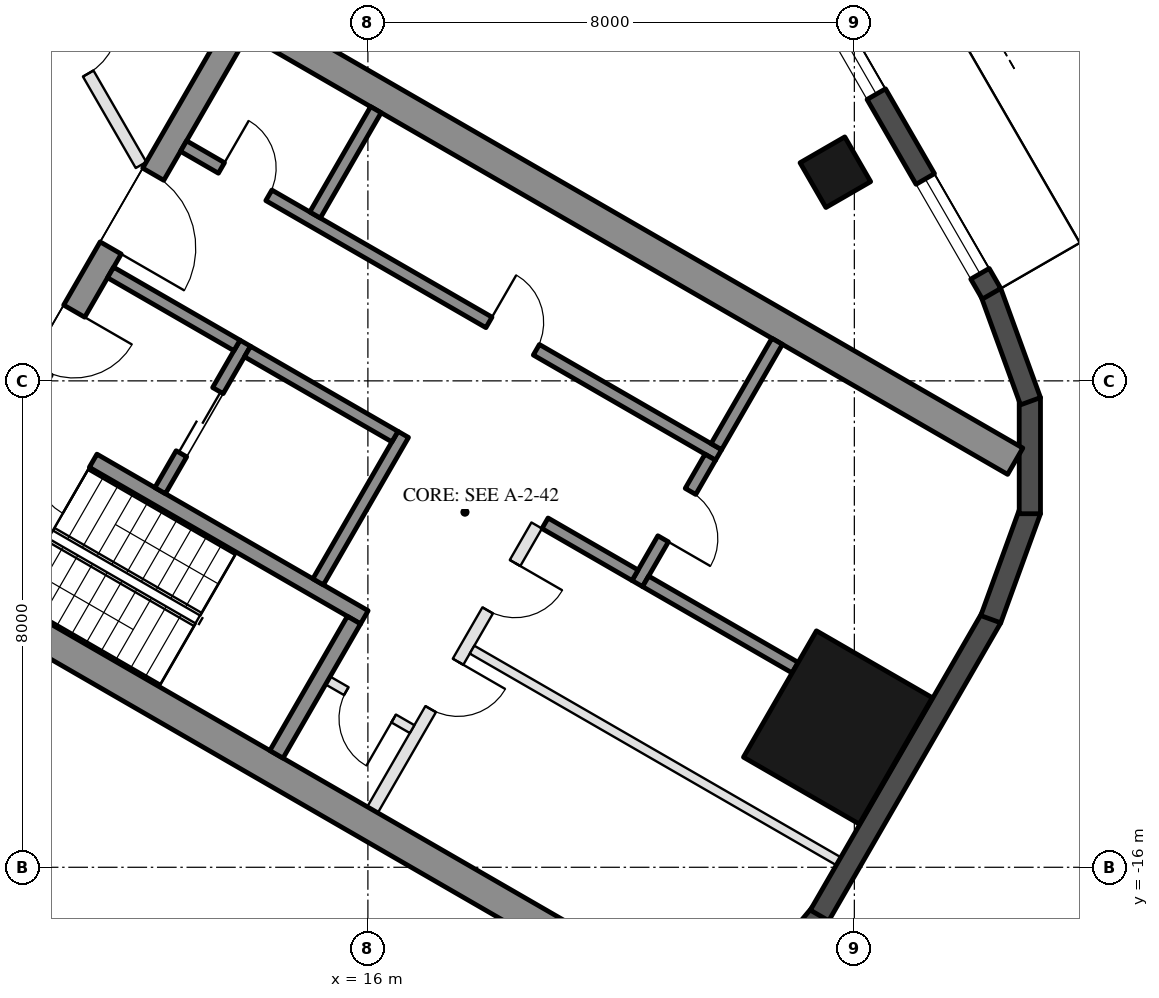
"""IFC4 building model, lengths in metres.
Left out: names, types, materials, properties, quantities, classifications, styles, units other than length and angle.
Written with IfcOpenShell. Run it as: python <this file> out.ifc"""

import sys

from ifc_helpers import new_model, si_unit, direction, frame, frame_2d, origin, origin_2d, place, context, subcontext, project, spatial, rectangle, hollow_rectangle, extrude, element, fill, save


model = new_model("IFC4")
c1 = context("Model", 3, precision=1e-05, world=origin(), true_north=direction((0.0, 1.0)))
c2 = subcontext(c1, "Body", "Model", "MODEL_VIEW")
j1 = project(units=[si_unit("LENGTHUNIT", "METRE"), si_unit("PLANEANGLEUNIT", "RADIAN")], contexts=[c1])
p1 = place(None, origin())
s1 = spatial("IfcSite", under=j1, at=p1, CompositionType="ELEMENT")
p2 = place(p1, origin())
s2 = spatial("IfcBuilding", under=s1, at=p2, CompositionType="ELEMENT")
p3 = place(p2, frame((0.0, 0.0, 179.9)))
s3 = spatial("IfcBuildingStorey", under=s2, at=p3, CompositionType="ELEMENT", Elevation=179.9)
p4 = place(p3, frame((23.688, -4.568, 0.0), z_axis=(0.0, 0.0, 1.0), x_axis=(-0.5, 0.866025403784, 0.0)))
e1 = element("IfcColumn", 1, at=p4, inside=s3, PredefinedType="COLUMN", context=c2, shape_type="SweptSolid", body=[
    extrude(hollow_rectangle(XDim=0.85, YDim=0.85, WallThickness=0.04, at=origin_2d()), origin(), (0.0, 0.0, 1.0), 3.7),
])
p5 = place(p3, frame((23.729, -13.7, 0.0), z_axis=(0.0, 0.0, 1.0), x_axis=(0.5, 0.866025403784, 0.0)))
e2 = element("IfcColumn", 2, at=p5, inside=s3, PredefinedType="COLUMN", context=c2, shape_type="SweptSolid", body=[
    extrude(hollow_rectangle(XDim=2.4, YDim=2.2, WallThickness=0.06, at=origin_2d()), origin(), (0.0, 0.0, 1.0), 3.7),
])
p6 = place(p3, frame((22.217, -18.231, 0.0), z_axis=(0.0, 0.0, 1.0), x_axis=(0.642733291068, 0.76609001857, 0.0)))
e3 = element("IfcWall", 3, at=p6, inside=s3, PredefinedType="SOLIDWALL", context=c2, shape_type="SweptSolid", body=[
    extrude(rectangle(XDim=1.91, YDim=0.35, at=frame_2d((0.955, 0.0))), origin(), (0.0, 0.0, 1.0), 3.55),
])
p7 = place(p3, frame((23.427, -16.792, 0.0), z_axis=(0.0, 0.0, 1.0), x_axis=(0.500018773155, 0.866014564827, 0.0)))
e4 = element("IfcWall", 4, at=p7, inside=s3, PredefinedType="SOLIDWALL", context=c2, shape_type="SweptSolid", body=[
    extrude(rectangle(XDim=5.658, YDim=0.35, at=frame_2d((2.829, 0.0))), origin(), (0.0, 0.0, 1.0), 3.55),
])
for number, where, z_axis, x_axis in (
    (5, (26.244, -11.92, 0.0), (0.0, 0.0, 1.0), (0.342, 0.94, 0.0)),
    (6, (26.886, -10.185, 0.0), (0.0, 0.0, 1.0), (0.0, 1.0, 0.0)),
    (7, (26.897, -8.335, 0.0), (0.0, 0.0, 1.0), (-0.342, 0.94, 0.0)),
):
    element("IfcWall", number, at=place(p3, frame(where, z_axis=z_axis, x_axis=x_axis)), inside=s3, PredefinedType="SOLIDWALL", context=c2, shape_type="SweptSolid", body=[
        extrude(rectangle(XDim=1.91, YDim=0.35, at=frame_2d((0.955, 0.0))), origin(), (0.0, 0.0, 1.0), 3.55),
    ])
p8 = place(p3, frame((26.257, -6.567, 0.0), z_axis=(0.0, 0.0, 1.0), x_axis=(-0.500023526245, 0.866011820475, 0.0)))
e8 = element("IfcWall", 8, at=p8, inside=s3, PredefinedType="SOLIDWALL", context=c2, shape_type="SweptSolid", body=[
    extrude(rectangle(XDim=11.816, YDim=0.35, at=frame_2d((5.908, 0.0))), origin(), (0.0, 0.0, 1.0), 3.55),
])
p9 = place(p8, frame((0.38, 0.0, 0.3)))
e9 = element("IfcOpeningElement", 9, at=p9, cuts=e8, PredefinedType="OPENING", context=c2, shape_type="SweptSolid", body=[
    extrude(rectangle(XDim=1.8, YDim=2.65, at=frame_2d((0.9, 1.325))), frame((0.0, 0.185, 0.0), z_axis=(0.0, -1.0, 0.0), x_axis=(1.0, 0.0, 0.0)), (0.0, 0.0, 1.0), 0.37),
])
p10 = place(p8, frame((7.741, 0.0, 0.0)))
e10 = element("IfcOpeningElement", 10, at=p10, cuts=e8, PredefinedType="OPENING", context=c2, shape_type="SweptSolid", body=[
    extrude(rectangle(XDim=2.4, YDim=2.4, at=frame_2d((1.2, 1.2))), frame((0.0, 0.185, 0.0), z_axis=(0.0, -1.0, 0.0), x_axis=(1.0, 0.0, 0.0)), (0.0, 0.0, 1.0), 0.37),
])
p11 = place(p8, frame((3.791, 0.0, 0.3)))
e11 = element("IfcOpeningElement", 11, at=p11, cuts=e8, PredefinedType="OPENING", context=c2, shape_type="SweptSolid", body=[
    extrude(rectangle(XDim=1.6, YDim=2.65, at=frame_2d((0.8, 1.325))), frame((0.0, 0.185, 0.0), z_axis=(0.0, -1.0, 0.0), x_axis=(1.0, 0.0, 0.0)), (0.0, 0.0, 1.0), 0.37),
])
p12 = place(p8, frame((5.691, 0.0, 0.3)))
e12 = element("IfcOpeningElement", 12, at=p12, cuts=e8, PredefinedType="OPENING", context=c2, shape_type="SweptSolid", body=[
    extrude(rectangle(XDim=1.6, YDim=2.65, at=frame_2d((0.8, 1.325))), frame((0.0, 0.185, 0.0), z_axis=(0.0, -1.0, 0.0), x_axis=(1.0, 0.0, 0.0)), (0.0, 0.0, 1.0), 0.37),
])
for number, where, z_axis, x_axis in (
    (13, (8.547, -10.997, 0.0), (0.0, 0.0, 1.0), (0.866, -0.5, 0.0)),
    (14, (13.797, -1.903, 0.0), (0.0, 0.0, 1.0), (0.866, -0.5, 0.0)),
):
    element("IfcWall", number, at=place(p3, frame(where, z_axis=z_axis, x_axis=x_axis)), inside=s3, PredefinedType="SHEAR", context=c2, shape_type="SweptSolid", body=[
        extrude(rectangle(XDim=14.837, YDim=0.5, at=frame_2d((7.418, 0.0))), origin(), (0.0, 0.0, 1.0), 3.5),
    ])
p13 = place(p3, frame((8.845, -10.88, 0.0), z_axis=(0.0, 0.0, 1.0), x_axis=(0.500004234368, 0.866022959057, 0.0)))
e15 = element("IfcWall", 15, at=p13, inside=s3, PredefinedType="SHEAR", context=c2, shape_type="SweptSolid", body=[
    extrude(rectangle(XDim=10.0, YDim=0.4, at=frame_2d((5.0, 0.0))), origin(), (0.0, 0.0, 1.0), 3.5),
])
p14 = place(p13, frame((3.55, 0.0, 0.0)))
e16 = element("IfcOpeningElement", 16, at=p14, cuts=e15, PredefinedType="OPENING", context=c2, shape_type="SweptSolid", body=[
    extrude(rectangle(XDim=1.1, YDim=2.1, at=frame_2d((0.55, 1.05))), frame((0.0, 0.21, 0.0), z_axis=(0.0, -1.0, 0.0), x_axis=(1.0, 0.0, 0.0)), (0.0, 0.0, 1.0), 0.42),
])
p15 = place(p13, frame((5.85, 0.0, 0.0)))
e17 = element("IfcOpeningElement", 17, at=p15, cuts=e15, PredefinedType="OPENING", context=c2, shape_type="SweptSolid", body=[
    extrude(rectangle(XDim=1.4, YDim=2.1, at=frame_2d((0.7, 1.05))), frame((0.0, 0.21, 0.0), z_axis=(0.0, -1.0, 0.0), x_axis=(1.0, 0.0, 0.0)), (0.0, 0.0, 1.0), 0.42),
])
p16 = place(p3, frame((10.356, -8.664, 0.0), z_axis=(0.0, 0.0, 1.0), x_axis=(0.866028629588, -0.499994412703, 0.0)))
e18 = element("IfcWall", 18, at=p16, inside=s3, PredefinedType="SHEAR", context=c2, shape_type="SweptSolid", body=[
    extrude(rectangle(XDim=6.45, YDim=0.25, at=frame_2d((3.225, 0.0))), origin(), (0.0, 0.0, 1.0), 3.5),
])
p17 = place(p16, frame((0.3, 0.0, 0.0)))
e19 = element("IfcOpeningElement", 19, at=p17, cuts=e18, PredefinedType="OPENING", context=c2, shape_type="SweptSolid", body=[
    extrude(rectangle(XDim=1.0, YDim=2.1, at=frame_2d((0.5, 1.05))), frame((0.0, 0.135, 0.0), z_axis=(0.0, -1.0, 0.0), x_axis=(1.0, 0.0, 0.0)), (0.0, 0.0, 1.0), 0.27),
])
p18 = place(p3, frame((14.496, -14.143, 0.0), z_axis=(0.0, 0.0, 1.0), x_axis=(0.500062241894, 0.865989465428, 0.0)))
e20 = element("IfcWall", 20, at=p18, inside=s3, PredefinedType="SHEAR", context=c2, shape_type="SweptSolid", body=[
    extrude(rectangle(XDim=2.55, YDim=0.25, at=frame_2d((1.275, 0.0))), origin(), (0.0, 0.0, 1.0), 3.5),
])
p19 = place(p3, frame((15.181, -11.305, 0.0), z_axis=(0.0, 0.0, 1.0), x_axis=(0.49994636267, 0.866056369097, 0.0)))
e21 = element("IfcWall", 21, at=p19, inside=s3, PredefinedType="SHEAR", context=c2, shape_type="SweptSolid", body=[
    extrude(rectangle(XDim=2.8, YDim=0.2, at=frame_2d((1.4, 0.0))), origin(), (0.0, 0.0, 1.0), 3.5),
])
p20 = place(p3, frame((12.583, -9.805, 0.0), z_axis=(0.0, 0.0, 1.0), x_axis=(0.49994636267, 0.866056369097, 0.0)))
e22 = element("IfcWall", 22, at=p20, inside=s3, PredefinedType="SHEAR", context=c2, shape_type="SweptSolid", body=[
    extrude(rectangle(XDim=2.8, YDim=0.2, at=frame_2d((1.4, 0.0))), origin(), (0.0, 0.0, 1.0), 3.5),
])
p21 = place(p20, frame((0.7, 0.0, 0.0)))
e23 = element("IfcOpeningElement", 23, at=p21, cuts=e22, PredefinedType="OPENING", context=c2, shape_type="SweptSolid", body=[
    extrude(rectangle(XDim=1.2, YDim=2.1, at=frame_2d((0.6, 1.05))), frame((0.0, 0.11, 0.0), z_axis=(0.0, -1.0, 0.0), x_axis=(1.0, 0.0, 0.0)), (0.0, 0.0, 1.0), 0.22),
])
p22 = place(p3, frame((11.768, -6.217, 0.0), z_axis=(0.0, 0.0, 1.0), x_axis=(0.866050077142, -0.499957262057, 0.0)))
e24 = element("IfcWall", 24, at=p22, inside=s3, PredefinedType="SHEAR", context=c2, shape_type="SweptSolid", body=[
    extrude(rectangle(XDim=2.4, YDim=0.2, at=frame_2d((1.2, 0.0))), origin(), (0.0, 0.0, 1.0), 3.5),
])
p23 = place(p3, frame((14.02, -7.517, 0.0), z_axis=(0.0, 0.0, 1.0), x_axis=(0.866034573852, -0.49998411664, 0.0)))
e25 = element("IfcWall", 25, at=p23, inside=s3, PredefinedType="SHEAR", context=c2, shape_type="SweptSolid", body=[
    extrude(rectangle(XDim=2.8, YDim=0.2, at=frame_2d((1.4, 0.0))), origin(), (0.0, 0.0, 1.0), 3.5),
])
p24 = place(p3, frame((12.968, -4.138, 0.0), z_axis=(0.0, 0.0, 1.0), x_axis=(0.866028328073, -0.49999493495, 0.0)))
e26 = element("IfcWall", 26, at=p24, inside=s3, PredefinedType="SHEAR", context=c2, shape_type="SweptSolid", body=[
    extrude(rectangle(XDim=10.16, YDim=0.2, at=frame_2d((5.08, 0.0))), origin(), (0.0, 0.0, 1.0), 3.5),
])
p25 = place(p24, frame((0.72, 0.0, 0.0)))
e27 = element("IfcOpeningElement", 27, at=p25, cuts=e26, PredefinedType="OPENING", context=c2, shape_type="SweptSolid", body=[
    extrude(rectangle(XDim=0.9, YDim=2.1, at=frame_2d((0.45, 1.05))), frame((0.0, 0.11, 0.0), z_axis=(0.0, -1.0, 0.0), x_axis=(1.0, 0.0, 0.0)), (0.0, 0.0, 1.0), 0.22),
])
p26 = place(p24, frame((5.8, 0.0, 0.0)))
e28 = element("IfcOpeningElement", 28, at=p26, cuts=e26, PredefinedType="OPENING", context=c2, shape_type="SweptSolid", body=[
    extrude(rectangle(XDim=0.9, YDim=2.1, at=frame_2d((0.45, 1.05))), frame((0.0, 0.11, 0.0), z_axis=(0.0, -1.0, 0.0), x_axis=(1.0, 0.0, 0.0)), (0.0, 0.0, 1.0), 0.22),
])
p27 = place(p3, frame((20.43, -11.333, 0.0), z_axis=(0.0, 0.0, 1.0), x_axis=(0.500001309137, 0.866024647952, 0.0)))
e29 = element("IfcWall", 29, at=p27, inside=s3, PredefinedType="SHEAR", context=c2, shape_type="SweptSolid", body=[
    extrude(rectangle(XDim=2.4, YDim=0.2, at=frame_2d((1.2, 0.0))), origin(), (0.0, 0.0, 1.0), 3.5),
])
p28 = place(p27, frame((0.85, 0.0, 0.0)))
e30 = element("IfcOpeningElement", 30, at=p28, cuts=e29, PredefinedType="OPENING", context=c2, shape_type="SweptSolid", body=[
    extrude(rectangle(XDim=0.9, YDim=2.1, at=frame_2d((0.45, 1.05))), frame((0.0, 0.11, 0.0), z_axis=(0.0, -1.0, 0.0), x_axis=(1.0, 0.0, 0.0)), (0.0, 0.0, 1.0), 0.22),
])
p29 = place(p3, frame((18.913, -10.342, 0.0), z_axis=(0.0, 0.0, 1.0), x_axis=(0.866038183914, -0.499977863513, 0.0)))
e31 = element("IfcWall", 31, at=p29, inside=s3, PredefinedType="SHEAR", context=c2, shape_type="SweptSolid", body=[
    extrude(rectangle(XDim=1.71, YDim=0.2, at=frame_2d((0.855, 0.0))), origin(), (0.0, 0.0, 1.0), 3.5),
])
for number, where, z_axis, x_axis in (
    (32, (15.131, -5.272, 0.0), (0.0, 0.0, 1.0), (0.5, 0.866, 0.0)),
    (33, (21.73, -9.082, 0.0), (0.0, 0.0, 1.0), (0.5, 0.866, 0.0)),
):
    element("IfcWall", number, at=place(p3, frame(where, z_axis=z_axis, x_axis=x_axis)), inside=s3, PredefinedType="SHEAR", context=c2, shape_type="SweptSolid", body=[
        extrude(rectangle(XDim=2.0, YDim=0.2, at=frame_2d((1.0, 0.0))), origin(), (0.0, 0.0, 1.0), 3.5),
    ])
p30 = place(p3, frame((20.567, -11.297, 0.0), z_axis=(0.0, 0.0, 1.0), x_axis=(0.866055327414, -0.49994816717, 0.0)))
e34 = element("IfcWall", 34, at=p30, inside=s3, PredefinedType="SHEAR", context=c2, shape_type="SweptSolid", body=[
    extrude(rectangle(XDim=2.84, YDim=0.2, at=frame_2d((1.42, 0.0))), origin(), (0.0, 0.0, 1.0), 3.5),
])
p31 = place(p3, frame((16.076, -15.055, 0.0), z_axis=(0.0, 0.0, 1.0), x_axis=(0.499995103361, 0.866028230842, 0.0)))
e35 = element("IfcWall", 35, at=p31, inside=s3, PredefinedType="PARTITIONING", context=c2, shape_type="SweptSolid", body=[
    extrude(rectangle(XDim=5.4, YDim=0.2, at=frame_2d((2.7, 0.0))), origin(), (0.0, 0.0, 1.0), 3.5),
])
p32 = place(p31, frame((1.913, 0.0, 0.0)))
e36 = element("IfcOpeningElement", 36, at=p32, cuts=e35, PredefinedType="OPENING", context=c2, shape_type="SweptSolid", body=[
    extrude(rectangle(XDim=0.9, YDim=2.1, at=frame_2d((0.45, 1.05))), frame((0.0, 0.11, 0.0), z_axis=(0.0, -1.0, 0.0), x_axis=(1.0, 0.0, 0.0)), (0.0, 0.0, 1.0), 0.22),
])
p33 = place(p31, frame((3.788, 0.0, 0.0)))
e37 = element("IfcOpeningElement", 37, at=p33, cuts=e35, PredefinedType="OPENING", context=c2, shape_type="SweptSolid", body=[
    extrude(rectangle(XDim=0.9, YDim=2.1, at=frame_2d((0.45, 1.05))), frame((0.0, 0.11, 0.0), z_axis=(0.0, -1.0, 0.0), x_axis=(1.0, 0.0, 0.0)), (0.0, 0.0, 1.0), 0.22),
])
p34 = place(p3, frame((15.342, -12.928, 0.0), z_axis=(0.0, 0.0, 1.0), x_axis=(0.865989903783, -0.500061482766, 0.0)))
e38 = element("IfcWall", 38, at=p34, inside=s3, PredefinedType="PARTITIONING", context=c2, shape_type="SweptSolid", body=[
    extrude(rectangle(XDim=1.6, YDim=0.15, at=frame_2d((0.8, 0.0))), origin(), (0.0, 0.0, 1.0), 3.5),
])
p35 = place(p34, frame((0.35, 0.0, 0.0)))
e39 = element("IfcOpeningElement", 39, at=p35, cuts=e38, PredefinedType="OPENING", context=c2, shape_type="SweptSolid", body=[
    extrude(rectangle(XDim=0.9, YDim=2.1, at=frame_2d((0.45, 1.05))), frame((0.0, 0.085, 0.0), z_axis=(0.0, -1.0, 0.0), x_axis=(1.0, 0.0, 0.0)), (0.0, 0.0, 1.0), 0.17),
])
p36 = place(p3, frame((17.713, -12.42, 0.0), z_axis=(0.0, 0.0, 1.0), x_axis=(0.866016523273, -0.500015381182, 0.0)))
e40 = element("IfcWall", 40, at=p36, inside=s3, PredefinedType="PARTITIONING", context=c2, shape_type="SweptSolid", body=[
    extrude(rectangle(XDim=6.95, YDim=0.15, at=frame_2d((3.475, 0.0))), origin(), (0.0, 0.0, 1.0), 3.5),
])
p37 = place(p3, frame((10.032, -0.576, 0.0), z_axis=(0.0, 0.0, 1.0), x_axis=(0.500042097992, -0.866001097133, 0.0)))
e41 = element("IfcWall", 41, at=p37, inside=s3, PredefinedType="PARTITIONING", context=c2, shape_type="SweptSolid", body=[
    extrude(rectangle(XDim=4.474, YDim=0.2, at=frame_2d((2.237, 0.0))), origin(), (0.0, 0.0, 1.0), 2.95),
])
p38 = place(p37, frame((1.737, 0.0, 0.0)))
e42 = element("IfcOpeningElement", 42, at=p38, cuts=e41, PredefinedType="OPENING", context=c2, shape_type="SweptSolid", body=[
    extrude(rectangle(XDim=1.0, YDim=2.1, at=frame_2d((0.5, 1.05))), frame((0.0, 0.11, 0.0), z_axis=(0.0, -1.0, 0.0), x_axis=(1.0, 0.0, 0.0)), (0.0, 0.0, 1.0), 0.22),
])
p39 = place(p9, origin())
e43 = element("IfcWindow", 43, at=p39, inside=s3, PartitioningType="SINGLE_PANEL", PredefinedType="WINDOW", context=c2, shape_type="SweptSolid", body=[
    extrude(rectangle(XDim=1.8, YDim=2.65, at=frame_2d((0.9, 1.325))), frame((0.0, 0.03, 0.0), z_axis=(0.0, -1.0, 0.0), x_axis=(1.0, 0.0, 0.0)), (0.0, 0.0, 1.0), 0.06),
])
fill(e9, e43)
p40 = place(p11, origin())
e44 = element("IfcWindow", 44, at=p40, inside=s3, PartitioningType="SINGLE_PANEL", PredefinedType="WINDOW", context=c2, shape_type="SweptSolid", body=[
    extrude(rectangle(XDim=1.6, YDim=2.65, at=frame_2d((0.8, 1.325))), frame((0.0, 0.03, 0.0), z_axis=(0.0, -1.0, 0.0), x_axis=(1.0, 0.0, 0.0)), (0.0, 0.0, 1.0), 0.06),
])
fill(e11, e44)
p41 = place(p21, origin())
e45 = element("IfcDoor", 45, at=p41, inside=s3, OperationType="DOUBLE_DOOR_SLIDING", PredefinedType="DOOR", context=c2, shape_type="SweptSolid", body=[
    extrude(rectangle(XDim=1.2, YDim=2.1, at=frame_2d((0.6, 1.05))), frame((0.0, 0.025, 0.0), z_axis=(0.0, -1.0, 0.0), x_axis=(1.0, 0.0, 0.0)), (0.0, 0.0, 1.0), 0.05),
])
fill(e23, e45)
p42 = place(p35, frame((0.9, 0.0, 0.0), z_axis=(0.0, 0.0, 1.0), x_axis=(-1.0, 0.0, 0.0)))
e46 = element("IfcDoor", 46, at=p42, inside=s3, OperationType="SINGLE_SWING_LEFT", PredefinedType="DOOR", context=c2, shape_type="SweptSolid", body=[
    extrude(rectangle(XDim=0.9, YDim=2.1, at=frame_2d((0.45, 1.05))), frame((0.0, 0.025, 0.0), z_axis=(0.0, -1.0, 0.0), x_axis=(1.0, 0.0, 0.0)), (0.0, 0.0, 1.0), 0.05),
])
fill(e39, e46)
p43 = place(p25, origin())
e47 = element("IfcDoor", 47, at=p43, inside=s3, OperationType="SINGLE_SWING_LEFT", PredefinedType="DOOR", context=c2, shape_type="SweptSolid", body=[
    extrude(rectangle(XDim=0.9, YDim=2.1, at=frame_2d((0.45, 1.05))), frame((0.0, 0.025, 0.0), z_axis=(0.0, -1.0, 0.0), x_axis=(1.0, 0.0, 0.0)), (0.0, 0.0, 1.0), 0.05),
])
fill(e27, e47)
p44 = place(p26, origin())
e48 = element("IfcDoor", 48, at=p44, inside=s3, OperationType="SINGLE_SWING_LEFT", PredefinedType="DOOR", context=c2, shape_type="SweptSolid", body=[
    extrude(rectangle(XDim=0.9, YDim=2.1, at=frame_2d((0.45, 1.05))), frame((0.0, 0.025, 0.0), z_axis=(0.0, -1.0, 0.0), x_axis=(1.0, 0.0, 0.0)), (0.0, 0.0, 1.0), 0.05),
])
fill(e28, e48)
p45 = place(p28, frame((0.9, 0.0, 0.0), z_axis=(0.0, 0.0, 1.0), x_axis=(-1.0, 0.0, 0.0)))
e49 = element("IfcDoor", 49, at=p45, inside=s3, OperationType="SINGLE_SWING_RIGHT", PredefinedType="DOOR", context=c2, shape_type="SweptSolid", body=[
    extrude(rectangle(XDim=0.9, YDim=2.1, at=frame_2d((0.45, 1.05))), frame((0.0, 0.025, 0.0), z_axis=(0.0, -1.0, 0.0), x_axis=(1.0, 0.0, 0.0)), (0.0, 0.0, 1.0), 0.05),
])
fill(e30, e49)
p46 = place(p32, frame((0.9, 0.0, 0.0), z_axis=(0.0, 0.0, 1.0), x_axis=(-1.0, 0.0, 0.0)))
e50 = element("IfcDoor", 50, at=p46, inside=s3, OperationType="SINGLE_SWING_LEFT", PredefinedType="DOOR", context=c2, shape_type="SweptSolid", body=[
    extrude(rectangle(XDim=0.9, YDim=2.1, at=frame_2d((0.45, 1.05))), frame((0.0, 0.025, 0.0), z_axis=(0.0, -1.0, 0.0), x_axis=(1.0, 0.0, 0.0)), (0.0, 0.0, 1.0), 0.05),
])
fill(e36, e50)
p47 = place(p33, frame((0.9, 0.0, 0.0), z_axis=(0.0, 0.0, 1.0), x_axis=(-1.0, 0.0, 0.0)))
e51 = element("IfcDoor", 51, at=p47, inside=s3, OperationType="SINGLE_SWING_LEFT", PredefinedType="DOOR", context=c2, shape_type="SweptSolid", body=[
    extrude(rectangle(XDim=0.9, YDim=2.1, at=frame_2d((0.45, 1.05))), frame((0.0, 0.025, 0.0), z_axis=(0.0, -1.0, 0.0), x_axis=(1.0, 0.0, 0.0)), (0.0, 0.0, 1.0), 0.05),
])
fill(e37, e51)
p48 = place(p14, frame((1.1, 0.0, 0.0), z_axis=(0.0, 0.0, 1.0), x_axis=(-1.0, 0.0, 0.0)))
e52 = element("IfcDoor", 52, at=p48, inside=s3, OperationType="SINGLE_SWING_LEFT", PredefinedType="DOOR", context=c2, shape_type="SweptSolid", body=[
    extrude(rectangle(XDim=1.1, YDim=2.1, at=frame_2d((0.55, 1.05))), frame((0.0, 0.025, 0.0), z_axis=(0.0, -1.0, 0.0), x_axis=(1.0, 0.0, 0.0)), (0.0, 0.0, 1.0), 0.05),
])
fill(e16, e52)
p49 = place(p15, frame((1.4, 0.0, 0.0), z_axis=(0.0, 0.0, 1.0), x_axis=(-1.0, 0.0, 0.0)))
e53 = element("IfcDoor", 53, at=p49, inside=s3, OperationType="DOUBLE_DOOR_SINGLE_SWING", PredefinedType="DOOR", context=c2, shape_type="SweptSolid", body=[
    extrude(rectangle(XDim=1.4, YDim=2.1, at=frame_2d((0.7, 1.05))), frame((0.0, 0.025, 0.0), z_axis=(0.0, -1.0, 0.0), x_axis=(1.0, 0.0, 0.0)), (0.0, 0.0, 1.0), 0.05),
])
fill(e17, e53)
p50 = place(p17, frame((1.0, 0.0, 0.0), z_axis=(0.0, 0.0, 1.0), x_axis=(-1.0, 0.0, 0.0)))
e54 = element("IfcDoor", 54, at=p50, inside=s3, OperationType="SINGLE_SWING_LEFT", PredefinedType="DOOR", context=c2, shape_type="SweptSolid", body=[
    extrude(rectangle(XDim=1.0, YDim=2.1, at=frame_2d((0.5, 1.05))), frame((0.0, 0.025, 0.0), z_axis=(0.0, -1.0, 0.0), x_axis=(1.0, 0.0, 0.0)), (0.0, 0.0, 1.0), 0.05),
])
fill(e19, e54)
p51 = place(p38, origin())
e55 = element("IfcDoor", 55, at=p51, inside=s3, OperationType="SINGLE_SWING_LEFT", PredefinedType="DOOR", context=c2, shape_type="SweptSolid", body=[
    extrude(rectangle(XDim=1.0, YDim=2.1, at=frame_2d((0.5, 1.05))), frame((0.0, 0.025, 0.0), z_axis=(0.0, -1.0, 0.0), x_axis=(1.0, 0.0, 0.0)), (0.0, 0.0, 1.0), 0.05),
])
fill(e42, e55)
save(model, sys.argv[1])
